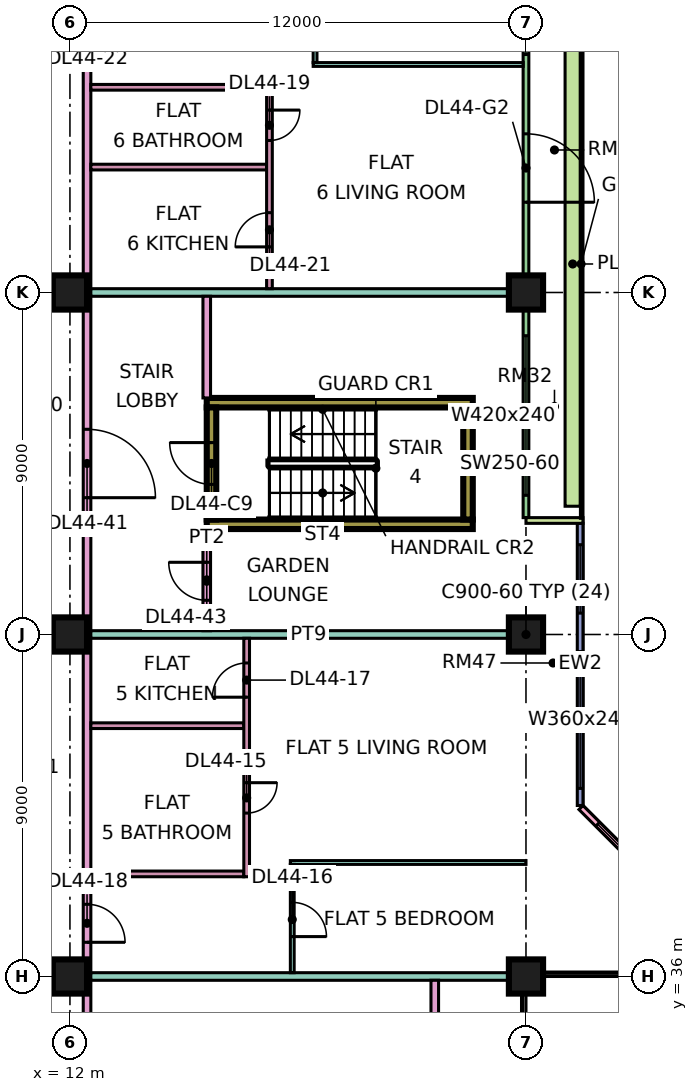
"""IFC4 building model, lengths in metres.
Left out: names, types, materials, properties, quantities, classifications, styles, units other than length and angle.
Written with IfcOpenShell. Run it as: python <this file> out.ifc"""

import sys

from ifc_helpers import new_model, si_unit, direction, frame, frame_2d, origin, origin_2d, place, context, subcontext, project, spatial, rectangle, extrude, element, fill, save


model = new_model("IFC4")
c1 = context("Model", 3, precision=1e-05, world=origin(), true_north=direction((0.0, 1.0)))
c2 = subcontext(c1, "Body", "Model", "MODEL_VIEW")
j1 = project(units=[si_unit("LENGTHUNIT", "METRE"), si_unit("PLANEANGLEUNIT", "RADIAN")], contexts=[c1])
p1 = place(None, origin())
s1 = spatial("IfcSite", under=j1, at=p1, CompositionType="ELEMENT")
p2 = place(p1, origin())
s2 = spatial("IfcBuilding", under=s1, at=p2, CompositionType="ELEMENT")
p3 = place(p2, frame((0.0, 0.0, 191.15)))
s3 = spatial("IfcBuildingStorey", under=s2, at=p3, CompositionType="ELEMENT", Elevation=191.15)
for number, where, z_axis, x_axis in (
    (1, (12.0, 36.0, 0.0), (0.0, 0.0, 1.0), (1.0, 0.0, 0.0)),
    (2, (12.0, 45.0, 0.0), (0.0, 0.0, 1.0), (1.0, 0.0, 0.0)),
    (3, (12.0, 54.0, 0.0), (0.0, 0.0, 1.0), (1.0, 0.0, 0.0)),
    (4, (24.0, 36.0, 0.0), (0.0, 0.0, 1.0), (1.0, 0.0, 0.0)),
    (5, (24.0, 45.0, 0.0), (0.0, 0.0, 1.0), (1.0, 0.0, 0.0)),
    (6, (24.0, 54.0, 0.0), (0.0, 0.0, 1.0), (1.0, 0.0, 0.0)),
):
    element("IfcColumn", number, at=place(p3, frame(where, z_axis=z_axis, x_axis=x_axis)), inside=s3, PredefinedType="COLUMN", context=c2, shape_type="SweptSolid", body=[
        extrude(rectangle(XDim=0.9, YDim=0.9, at=origin_2d()), origin(), (0.0, 0.0, 1.0), 3.75),
    ])
for number, where, z_axis, x_axis in (
    (7, (15.6, 47.9, 0.0), (0.0, 0.0, 1.0), (1.0, 0.0, 0.0)),
    (8, (15.6, 51.1, 0.0), (0.0, 0.0, 1.0), (1.0, 0.0, 0.0)),
):
    element("IfcWall", number, at=place(p3, frame(where, z_axis=z_axis, x_axis=x_axis)), inside=s3, PredefinedType="SHEAR", context=c2, shape_type="SweptSolid", body=[
        extrude(rectangle(XDim=7.0, YDim=0.25, at=frame_2d((3.5, 0.0))), origin(), (0.0, 0.0, 1.0), 3.75),
    ])
p4 = place(p3, frame((15.725, 48.025, 0.0), z_axis=(0.0, 0.0, 1.0), x_axis=(0.0, 1.0, 0.0)))
e9 = element("IfcWall", 9, at=p4, inside=s3, PredefinedType="SHEAR", context=c2, shape_type="SweptSolid", body=[
    extrude(rectangle(XDim=2.95, YDim=0.25, at=frame_2d((1.475, 0.0))), origin(), (0.0, 0.0, 1.0), 3.75),
])
p5 = place(p4, frame((0.925, 0.0, 0.0)))
e10 = element("IfcOpeningElement", 10, at=p5, cuts=e9, PredefinedType="OPENING", context=c2, shape_type="SweptSolid", body=[
    extrude(rectangle(XDim=1.1, YDim=2.2, at=frame_2d((0.55, 1.1))), frame((0.0, 0.135, 0.0), z_axis=(0.0, -1.0, 0.0), x_axis=(1.0, 0.0, 0.0)), (0.0, 0.0, 1.0), 0.27),
])
p6 = place(p3, frame((22.475, 48.025, 0.0), z_axis=(0.0, 0.0, 1.0), x_axis=(0.0, 1.0, 0.0)))
e11 = element("IfcWall", 11, at=p6, inside=s3, PredefinedType="SHEAR", context=c2, shape_type="SweptSolid", body=[
    extrude(rectangle(XDim=2.95, YDim=0.25, at=frame_2d((1.475, 0.0))), origin(), (0.0, 0.0, 1.0), 3.75),
])
p7 = place(p3, frame((28.447, 37.447, 0.0), z_axis=(0.0, 0.0, 1.0), x_axis=(-0.707106781187, 0.707106781187, 0.0)))
e12 = element("IfcWall", 12, at=p7, inside=s3, PredefinedType="SOLIDWALL", context=c2, shape_type="SweptSolid", body=[
    extrude(rectangle(XDim=4.243, YDim=0.15, at=frame_2d((2.121, 0.0))), origin(), (0.0, 0.0, 1.0), 3.35),
])
p8 = place(p7, frame((0.621, 0.0, 0.45)))
e13 = element("IfcOpeningElement", 13, at=p8, cuts=e12, PredefinedType="OPENING", context=c2, shape_type="SweptSolid", body=[
    extrude(rectangle(XDim=3.0, YDim=2.4, at=frame_2d((1.5, 1.2))), frame((0.0, 0.085, 0.0), z_axis=(0.0, -1.0, 0.0), x_axis=(1.0, 0.0, 0.0)), (0.0, 0.0, 1.0), 0.17),
])
p9 = place(p3, frame((25.425, 40.5, 0.0), z_axis=(0.0, 0.0, 1.0), x_axis=(0.0, 1.0, 0.0)))
e14 = element("IfcWall", 14, at=p9, inside=s3, PredefinedType="SOLIDWALL", context=c2, shape_type="SweptSolid", body=[
    extrude(rectangle(XDim=7.425, YDim=0.15, at=frame_2d((3.712, 0.0))), origin(), (0.0, 0.0, 1.0), 3.35),
])
p10 = place(p9, frame((0.45, 0.0, 0.45)))
e15 = element("IfcOpeningElement", 15, at=p10, cuts=e14, PredefinedType="OPENING", context=c2, shape_type="SweptSolid", body=[
    extrude(rectangle(XDim=3.6, YDim=2.4, at=frame_2d((1.8, 1.2))), frame((0.0, 0.085, 0.0), z_axis=(0.0, -1.0, 0.0), x_axis=(1.0, 0.0, 0.0)), (0.0, 0.0, 1.0), 0.17),
])
p11 = place(p9, frame((5.062, 0.0, 0.45)))
e16 = element("IfcOpeningElement", 16, at=p11, cuts=e14, PredefinedType="OPENING", context=c2, shape_type="SweptSolid", body=[
    extrude(rectangle(XDim=1.8, YDim=2.4, at=frame_2d((0.9, 1.2))), frame((0.0, 0.085, 0.0), z_axis=(0.0, -1.0, 0.0), x_axis=(1.0, 0.0, 0.0)), (0.0, 0.0, 1.0), 0.17),
])
p12 = place(p3, frame((24.0, 48.075, 0.0), z_axis=(0.0, 0.0, 1.0), x_axis=(0.0, 1.0, 0.0)))
e17 = element("IfcWall", 17, at=p12, inside=s3, PredefinedType="SOLIDWALL", context=c2, shape_type="SweptSolid", body=[
    extrude(rectangle(XDim=13.35, YDim=0.15, at=frame_2d((6.675, 0.0))), origin(), (0.0, 0.0, 1.0), 3.35),
])
p13 = place(p12, frame((0.587, 0.0, 0.45)))
e18 = element("IfcOpeningElement", 18, at=p13, cuts=e17, PredefinedType="OPENING", context=c2, shape_type="SweptSolid", body=[
    extrude(rectangle(XDim=4.2, YDim=2.4, at=frame_2d((2.1, 1.2))), frame((0.0, 0.085, 0.0), z_axis=(0.0, -1.0, 0.0), x_axis=(1.0, 0.0, 0.0)), (0.0, 0.0, 1.0), 0.17),
])
p14 = place(p12, frame((8.3, 0.0, 0.0)))
e19 = element("IfcOpeningElement", 19, at=p14, cuts=e17, PredefinedType="OPENING", context=c2, shape_type="SweptSolid", body=[
    extrude(rectangle(XDim=1.8, YDim=2.4, at=frame_2d((0.9, 1.2))), frame((0.0, 0.085, 0.0), z_axis=(0.0, -1.0, 0.0), x_axis=(1.0, 0.0, 0.0)), (0.0, 0.0, 1.0), 0.17),
])
p15 = place(p12, frame((12.188, 0.0, 0.45)))
e20 = element("IfcOpeningElement", 20, at=p15, cuts=e17, PredefinedType="OPENING", context=c2, shape_type="SweptSolid", body=[
    extrude(rectangle(XDim=0.9, YDim=2.4, at=frame_2d((0.45, 1.2))), frame((0.0, 0.085, 0.0), z_axis=(0.0, -1.0, 0.0), x_axis=(1.0, 0.0, 0.0)), (0.0, 0.0, 1.0), 0.17),
])
p16 = place(p3, frame((25.5, 48.0, 0.0), z_axis=(0.0, 0.0, 1.0), x_axis=(-1.0, 0.0, 0.0)))
e21 = element("IfcWall", 21, at=p16, inside=s3, PredefinedType="SOLIDWALL", context=c2, shape_type="SweptSolid", body=[
    extrude(rectangle(XDim=1.5, YDim=0.15, at=frame_2d((0.75, 0.0))), origin(), (0.0, 0.0, 1.0), 3.35),
])
p17 = place(p3, frame((25.229, 48.375, 0.0), z_axis=(0.0, 0.0, 1.0), x_axis=(0.0, 1.0, 0.0)))
e22 = element("IfcWall", 22, at=p17, inside=s3, PredefinedType="SOLIDWALL", context=c2, shape_type="SweptSolid", body=[
    extrude(rectangle(XDim=12.75, YDim=0.4, at=frame_2d((6.375, 0.0))), origin(), (0.0, 0.0, 1.0), 0.7),
])
p18 = place(p3, frame((12.45, 20.0, 0.0), z_axis=(0.0, 0.0, 1.0), x_axis=(0.0, 1.0, 0.0)))
e23 = element("IfcWall", 23, at=p18, inside=s3, PredefinedType="PARTITIONING", context=c2, shape_type="SweptSolid", body=[
    extrude(rectangle(XDim=43.0, YDim=0.2, at=frame_2d((21.5, 0.0))), origin(), (0.0, 0.0, 1.0), 3.35),
])
p19 = place(p18, frame((6.7, 0.0, 0.0)))
e24 = element("IfcOpeningElement", 24, at=p19, cuts=e23, PredefinedType="OPENING", context=c2, shape_type="SweptSolid", body=[
    extrude(rectangle(XDim=1.6, YDim=2.1, at=frame_2d((0.8, 1.05))), frame((0.0, 0.11, 0.0), z_axis=(0.0, -1.0, 0.0), x_axis=(1.0, 0.0, 0.0)), (0.0, 0.0, 1.0), 0.22),
])
p20 = place(p18, frame((12.95, 0.0, 0.0)))
e25 = element("IfcOpeningElement", 25, at=p20, cuts=e23, PredefinedType="OPENING", context=c2, shape_type="SweptSolid", body=[
    extrude(rectangle(XDim=1.0, YDim=2.1, at=frame_2d((0.5, 1.05))), frame((0.0, 0.11, 0.0), z_axis=(0.0, -1.0, 0.0), x_axis=(1.0, 0.0, 0.0)), (0.0, 0.0, 1.0), 0.22),
])
p21 = place(p18, frame((16.9, 0.0, 0.0)))
e26 = element("IfcOpeningElement", 26, at=p21, cuts=e23, PredefinedType="OPENING", context=c2, shape_type="SweptSolid", body=[
    extrude(rectangle(XDim=1.0, YDim=2.1, at=frame_2d((0.5, 1.05))), frame((0.0, 0.11, 0.0), z_axis=(0.0, -1.0, 0.0), x_axis=(1.0, 0.0, 0.0)), (0.0, 0.0, 1.0), 0.22),
])
p22 = place(p18, frame((40.75, 0.0, 0.0)))
e27 = element("IfcOpeningElement", 27, at=p22, cuts=e23, PredefinedType="OPENING", context=c2, shape_type="SweptSolid", body=[
    extrude(rectangle(XDim=1.0, YDim=2.1, at=frame_2d((0.5, 1.05))), frame((0.0, 0.11, 0.0), z_axis=(0.0, -1.0, 0.0), x_axis=(1.0, 0.0, 0.0)), (0.0, 0.0, 1.0), 0.22),
])
p23 = place(p18, frame((1.15, 0.0, 0.0)))
e28 = element("IfcOpeningElement", 28, at=p23, cuts=e23, PredefinedType="OPENING", context=c2, shape_type="SweptSolid", body=[
    extrude(rectangle(XDim=1.8, YDim=2.1, at=frame_2d((0.9, 1.05))), frame((0.0, 0.11, 0.0), z_axis=(0.0, -1.0, 0.0), x_axis=(1.0, 0.0, 0.0)), (0.0, 0.0, 1.0), 0.22),
])
p24 = place(p18, frame((28.6, 0.0, 0.0)))
e29 = element("IfcOpeningElement", 29, at=p24, cuts=e23, PredefinedType="OPENING", context=c2, shape_type="SweptSolid", body=[
    extrude(rectangle(XDim=1.8, YDim=2.1, at=frame_2d((0.9, 1.05))), frame((0.0, 0.11, 0.0), z_axis=(0.0, -1.0, 0.0), x_axis=(1.0, 0.0, 0.0)), (0.0, 0.0, 1.0), 0.22),
])
p25 = place(p3, frame((12.55, 36.0, 0.0), z_axis=(0.0, 0.0, 1.0), x_axis=(1.0, 0.0, 0.0)))
e30 = element("IfcWall", 30, at=p25, inside=s3, PredefinedType="PARTITIONING", context=c2, shape_type="SweptSolid", body=[
    extrude(rectangle(XDim=11.45, YDim=0.2, at=frame_2d((5.725, 0.0))), origin(), (0.0, 0.0, 1.0), 3.35),
])
for number, where, z_axis, x_axis in (
    (31, (12.55, 38.7, 0.0), (0.0, 0.0, 1.0), (1.0, 0.0, 0.0)),
    (32, (12.55, 42.6, 0.0), (0.0, 0.0, 1.0), (1.0, 0.0, 0.0)),
):
    element("IfcWall", number, at=place(p3, frame(where, z_axis=z_axis, x_axis=x_axis)), inside=s3, PredefinedType="PARTITIONING", context=c2, shape_type="SweptSolid", body=[
        extrude(rectangle(XDim=4.025, YDim=0.15, at=frame_2d((2.012, 0.0))), origin(), (0.0, 0.0, 1.0), 3.35),
    ])
p26 = place(p3, frame((12.55, 45.0, 0.0), z_axis=(0.0, 0.0, 1.0), x_axis=(1.0, 0.0, 0.0)))
e33 = element("IfcWall", 33, at=p26, inside=s3, PredefinedType="PARTITIONING", context=c2, shape_type="SweptSolid", body=[
    extrude(rectangle(XDim=11.45, YDim=0.2, at=frame_2d((5.725, 0.0))), origin(), (0.0, 0.0, 1.0), 3.35),
])
p27 = place(p3, frame((12.55, 54.0, 0.0), z_axis=(0.0, 0.0, 1.0), x_axis=(1.0, 0.0, 0.0)))
e34 = element("IfcWall", 34, at=p27, inside=s3, PredefinedType="PARTITIONING", context=c2, shape_type="SweptSolid", body=[
    extrude(rectangle(XDim=11.376, YDim=0.2, at=frame_2d((5.688, 0.0))), origin(), (0.0, 0.0, 1.0), 3.35),
])
for number, where, z_axis, x_axis in (
    (35, (12.55, 57.3, 0.0), (0.0, 0.0, 1.0), (1.0, 0.0, 0.0)),
    (36, (12.55, 59.4, 0.0), (0.0, 0.0, 1.0), (1.0, 0.0, 0.0)),
):
    element("IfcWall", number, at=place(p3, frame(where, z_axis=z_axis, x_axis=x_axis)), inside=s3, PredefinedType="PARTITIONING", context=c2, shape_type="SweptSolid", body=[
        extrude(rectangle(XDim=4.625, YDim=0.15, at=frame_2d((2.312, 0.0))), origin(), (0.0, 0.0, 1.0), 3.35),
    ])
p28 = place(p3, frame((15.6, 45.1, 0.0), z_axis=(0.0, 0.0, 1.0), x_axis=(0.0, 1.0, 0.0)))
e37 = element("IfcWall", 37, at=p28, inside=s3, PredefinedType="PARTITIONING", context=c2, shape_type="SweptSolid", body=[
    extrude(rectangle(XDim=2.675, YDim=0.2, at=frame_2d((1.337, 0.0))), origin(), (0.0, 0.0, 1.0), 3.35),
])
p29 = place(p28, frame((0.8, 0.0, 0.0)))
e38 = element("IfcOpeningElement", 38, at=p29, cuts=e37, PredefinedType="OPENING", context=c2, shape_type="SweptSolid", body=[
    extrude(rectangle(XDim=1.0, YDim=2.1, at=frame_2d((0.5, 1.05))), frame((0.0, 0.11, 0.0), z_axis=(0.0, -1.0, 0.0), x_axis=(1.0, 0.0, 0.0)), (0.0, 0.0, 1.0), 0.22),
])
p30 = place(p3, frame((15.6, 51.225, 0.0), z_axis=(0.0, 0.0, 1.0), x_axis=(0.0, 1.0, 0.0)))
e39 = element("IfcWall", 39, at=p30, inside=s3, PredefinedType="PARTITIONING", context=c2, shape_type="SweptSolid", body=[
    extrude(rectangle(XDim=2.675, YDim=0.2, at=frame_2d((1.337, 0.0))), origin(), (0.0, 0.0, 1.0), 3.35),
])
p31 = place(p3, frame((16.65, 38.625, 0.0), z_axis=(0.0, 0.0, 1.0), x_axis=(0.0, 1.0, 0.0)))
e40 = element("IfcWall", 40, at=p31, inside=s3, PredefinedType="PARTITIONING", context=c2, shape_type="SweptSolid", body=[
    extrude(rectangle(XDim=6.275, YDim=0.15, at=frame_2d((3.137, 0.0))), origin(), (0.0, 0.0, 1.0), 3.35),
])
p32 = place(p31, frame((1.675, 0.0, 0.0)))
e41 = element("IfcOpeningElement", 41, at=p32, cuts=e40, PredefinedType="OPENING", context=c2, shape_type="SweptSolid", body=[
    extrude(rectangle(XDim=0.8, YDim=2.1, at=frame_2d((0.4, 1.05))), frame((0.0, 0.085, 0.0), z_axis=(0.0, -1.0, 0.0), x_axis=(1.0, 0.0, 0.0)), (0.0, 0.0, 1.0), 0.17),
])
p33 = place(p31, frame((4.725, 0.0, 0.0)))
e42 = element("IfcOpeningElement", 42, at=p33, cuts=e40, PredefinedType="OPENING", context=c2, shape_type="SweptSolid", body=[
    extrude(rectangle(XDim=0.9, YDim=2.1, at=frame_2d((0.45, 1.05))), frame((0.0, 0.085, 0.0), z_axis=(0.0, -1.0, 0.0), x_axis=(1.0, 0.0, 0.0)), (0.0, 0.0, 1.0), 0.17),
])
p34 = place(p3, frame((17.25, 54.1, 0.0), z_axis=(0.0, 0.0, 1.0), x_axis=(0.0, 1.0, 0.0)))
e43 = element("IfcWall", 43, at=p34, inside=s3, PredefinedType="PARTITIONING", context=c2, shape_type="SweptSolid", body=[
    extrude(rectangle(XDim=5.375, YDim=0.15, at=frame_2d((2.688, 0.0))), origin(), (0.0, 0.0, 1.0), 3.35),
])
p35 = place(p34, frame((3.9, 0.0, 0.0)))
e44 = element("IfcOpeningElement", 44, at=p35, cuts=e43, PredefinedType="OPENING", context=c2, shape_type="SweptSolid", body=[
    extrude(rectangle(XDim=0.8, YDim=2.1, at=frame_2d((0.4, 1.05))), frame((0.0, 0.085, 0.0), z_axis=(0.0, -1.0, 0.0), x_axis=(1.0, 0.0, 0.0)), (0.0, 0.0, 1.0), 0.17),
])
p36 = place(p34, frame((1.1, 0.0, 0.0)))
e45 = element("IfcOpeningElement", 45, at=p36, cuts=e43, PredefinedType="OPENING", context=c2, shape_type="SweptSolid", body=[
    extrude(rectangle(XDim=0.9, YDim=2.1, at=frame_2d((0.45, 1.05))), frame((0.0, 0.085, 0.0), z_axis=(0.0, -1.0, 0.0), x_axis=(1.0, 0.0, 0.0)), (0.0, 0.0, 1.0), 0.17),
])
p37 = place(p3, frame((17.8, 39.0, 0.0), z_axis=(0.0, 0.0, 1.0), x_axis=(1.0, 0.0, 0.0)))
e46 = element("IfcWall", 46, at=p37, inside=s3, PredefinedType="PARTITIONING", context=c2, shape_type="SweptSolid", body=[
    extrude(rectangle(XDim=6.2, YDim=0.1, at=frame_2d((3.1, 0.0))), origin(), (0.0, 0.0, 1.0), 3.35),
])
p38 = place(p3, frame((17.85, 36.1, 0.0), z_axis=(0.0, 0.0, 1.0), x_axis=(0.0, 1.0, 0.0)))
e47 = element("IfcWall", 47, at=p38, inside=s3, PredefinedType="PARTITIONING", context=c2, shape_type="SweptSolid", body=[
    extrude(rectangle(XDim=2.85, YDim=0.1, at=frame_2d((1.425, 0.0))), origin(), (0.0, 0.0, 1.0), 3.35),
])
p39 = place(p38, frame((0.95, 0.0, 0.0)))
e48 = element("IfcOpeningElement", 48, at=p39, cuts=e47, PredefinedType="OPENING", context=c2, shape_type="SweptSolid", body=[
    extrude(rectangle(XDim=0.9, YDim=2.1, at=frame_2d((0.45, 1.05))), frame((0.0, 0.06, 0.0), z_axis=(0.0, -1.0, 0.0), x_axis=(1.0, 0.0, 0.0)), (0.0, 0.0, 1.0), 0.12),
])
p40 = place(p3, frame((18.4, 60.0, 0.0), z_axis=(0.0, 0.0, 1.0), x_axis=(1.0, 0.0, 0.0)))
e49 = element("IfcWall", 49, at=p40, inside=s3, PredefinedType="PARTITIONING", context=c2, shape_type="SweptSolid", body=[
    extrude(rectangle(XDim=5.526, YDim=0.1, at=frame_2d((2.763, 0.0))), origin(), (0.0, 0.0, 1.0), 3.35),
])
p41 = place(p3, frame((18.45, 60.05, 0.0), z_axis=(0.0, 0.0, 1.0), x_axis=(0.0, 1.0, 0.0)))
e50 = element("IfcWall", 50, at=p41, inside=s3, PredefinedType="PARTITIONING", context=c2, shape_type="SweptSolid", body=[
    extrude(rectangle(XDim=3.0, YDim=0.1, at=frame_2d((1.5, 0.0))), origin(), (0.0, 0.0, 1.0), 3.35),
])
p42 = place(p41, frame((1.0, 0.0, 0.0)))
e51 = element("IfcOpeningElement", 51, at=p42, cuts=e50, PredefinedType="OPENING", context=c2, shape_type="SweptSolid", body=[
    extrude(rectangle(XDim=0.9, YDim=2.1, at=frame_2d((0.45, 1.05))), frame((0.0, 0.06, 0.0), z_axis=(0.0, -1.0, 0.0), x_axis=(1.0, 0.0, 0.0)), (0.0, 0.0, 1.0), 0.12),
])
p43 = place(p3, frame((21.6, 23.9, 0.0), z_axis=(0.0, 0.0, 1.0), x_axis=(0.0, 1.0, 0.0)))
e52 = element("IfcWall", 52, at=p43, inside=s3, PredefinedType="PARTITIONING", context=c2, shape_type="SweptSolid", body=[
    extrude(rectangle(XDim=12.0, YDim=0.2, at=frame_2d((6.0, 0.0))), origin(), (0.0, 0.0, 1.0), 3.35),
])
p44 = place(p8, origin())
e53 = element("IfcWindow", 53, at=p44, inside=s3, PartitioningType="SINGLE_PANEL", PredefinedType="WINDOW", context=c2, shape_type="SweptSolid", body=[
    extrude(rectangle(XDim=3.0, YDim=2.4, at=frame_2d((1.5, 1.2))), frame((0.0, 0.03, 0.0), z_axis=(0.0, -1.0, 0.0), x_axis=(1.0, 0.0, 0.0)), (0.0, 0.0, 1.0), 0.06),
])
fill(e13, e53)
p45 = place(p10, origin())
e54 = element("IfcWindow", 54, at=p45, inside=s3, PartitioningType="SINGLE_PANEL", PredefinedType="WINDOW", context=c2, shape_type="SweptSolid", body=[
    extrude(rectangle(XDim=3.6, YDim=2.4, at=frame_2d((1.8, 1.2))), frame((0.0, 0.03, 0.0), z_axis=(0.0, -1.0, 0.0), x_axis=(1.0, 0.0, 0.0)), (0.0, 0.0, 1.0), 0.06),
])
fill(e15, e54)
p46 = place(p11, origin())
e55 = element("IfcWindow", 55, at=p46, inside=s3, PartitioningType="SINGLE_PANEL", PredefinedType="WINDOW", context=c2, shape_type="SweptSolid", body=[
    extrude(rectangle(XDim=1.8, YDim=2.4, at=frame_2d((0.9, 1.2))), frame((0.0, 0.03, 0.0), z_axis=(0.0, -1.0, 0.0), x_axis=(1.0, 0.0, 0.0)), (0.0, 0.0, 1.0), 0.06),
])
fill(e16, e55)
p47 = place(p13, origin())
e56 = element("IfcWindow", 56, at=p47, inside=s3, PartitioningType="SINGLE_PANEL", PredefinedType="WINDOW", context=c2, shape_type="SweptSolid", body=[
    extrude(rectangle(XDim=4.2, YDim=2.4, at=frame_2d((2.1, 1.2))), frame((0.0, 0.03, 0.0), z_axis=(0.0, -1.0, 0.0), x_axis=(1.0, 0.0, 0.0)), (0.0, 0.0, 1.0), 0.06),
])
fill(e18, e56)
p48 = place(p14, frame((1.8, 0.0, 0.0), z_axis=(0.0, 0.0, 1.0), x_axis=(-1.0, 0.0, 0.0)))
e57 = element("IfcDoor", 57, at=p48, inside=s3, OperationType="DOUBLE_DOOR_SINGLE_SWING", PredefinedType="DOOR", context=c2, shape_type="SweptSolid", body=[
    extrude(rectangle(XDim=1.8, YDim=2.4, at=frame_2d((0.9, 1.2))), frame((0.0, 0.025, 0.0), z_axis=(0.0, -1.0, 0.0), x_axis=(1.0, 0.0, 0.0)), (0.0, 0.0, 1.0), 0.05),
])
fill(e19, e57)
p49 = place(p15, origin())
e58 = element("IfcWindow", 58, at=p49, inside=s3, PartitioningType="SINGLE_PANEL", PredefinedType="WINDOW", context=c2, shape_type="SweptSolid", body=[
    extrude(rectangle(XDim=0.9, YDim=2.4, at=frame_2d((0.45, 1.2))), frame((0.0, 0.03, 0.0), z_axis=(0.0, -1.0, 0.0), x_axis=(1.0, 0.0, 0.0)), (0.0, 0.0, 1.0), 0.06),
])
fill(e20, e58)
p50 = place(p5, frame((1.1, 0.0, 0.0), z_axis=(0.0, 0.0, 1.0), x_axis=(-1.0, 0.0, 0.0)))
e59 = element("IfcDoor", 59, at=p50, inside=s3, OperationType="SINGLE_SWING_RIGHT", PredefinedType="DOOR", context=c2, shape_type="SweptSolid", body=[
    extrude(rectangle(XDim=1.1, YDim=2.2, at=frame_2d((0.55, 1.1))), frame((0.0, 0.025, 0.0), z_axis=(0.0, -1.0, 0.0), x_axis=(1.0, 0.0, 0.0)), (0.0, 0.0, 1.0), 0.05),
])
fill(e10, e59)
p51 = place(p32, origin())
e60 = element("IfcDoor", 60, at=p51, inside=s3, OperationType="SINGLE_SWING_RIGHT", PredefinedType="DOOR", context=c2, shape_type="SweptSolid", body=[
    extrude(rectangle(XDim=0.8, YDim=2.1, at=frame_2d((0.4, 1.05))), frame((0.0, 0.025, 0.0), z_axis=(0.0, -1.0, 0.0), x_axis=(1.0, 0.0, 0.0)), (0.0, 0.0, 1.0), 0.05),
])
fill(e41, e60)
p52 = place(p39, frame((0.9, 0.0, 0.0), z_axis=(0.0, 0.0, 1.0), x_axis=(-1.0, 0.0, 0.0)))
e61 = element("IfcDoor", 61, at=p52, inside=s3, OperationType="SINGLE_SWING_LEFT", PredefinedType="DOOR", context=c2, shape_type="SweptSolid", body=[
    extrude(rectangle(XDim=0.9, YDim=2.1, at=frame_2d((0.45, 1.05))), frame((0.0, 0.025, 0.0), z_axis=(0.0, -1.0, 0.0), x_axis=(1.0, 0.0, 0.0)), (0.0, 0.0, 1.0), 0.05),
])
fill(e48, e61)
p53 = place(p33, origin())
e62 = element("IfcDoor", 62, at=p53, inside=s3, OperationType="SINGLE_SWING_LEFT", PredefinedType="DOOR", context=c2, shape_type="SweptSolid", body=[
    extrude(rectangle(XDim=0.9, YDim=2.1, at=frame_2d((0.45, 1.05))), frame((0.0, 0.025, 0.0), z_axis=(0.0, -1.0, 0.0), x_axis=(1.0, 0.0, 0.0)), (0.0, 0.0, 1.0), 0.05),
])
fill(e42, e62)
p54 = place(p21, frame((1.0, 0.0, 0.0), z_axis=(0.0, 0.0, 1.0), x_axis=(-1.0, 0.0, 0.0)))
e63 = element("IfcDoor", 63, at=p54, inside=s3, OperationType="SINGLE_SWING_LEFT", PredefinedType="DOOR", context=c2, shape_type="SweptSolid", body=[
    extrude(rectangle(XDim=1.0, YDim=2.1, at=frame_2d((0.5, 1.05))), frame((0.0, 0.025, 0.0), z_axis=(0.0, -1.0, 0.0), x_axis=(1.0, 0.0, 0.0)), (0.0, 0.0, 1.0), 0.05),
])
fill(e26, e63)
p55 = place(p35, origin())
e64 = element("IfcDoor", 64, at=p55, inside=s3, OperationType="SINGLE_SWING_RIGHT", PredefinedType="DOOR", context=c2, shape_type="SweptSolid", body=[
    extrude(rectangle(XDim=0.8, YDim=2.1, at=frame_2d((0.4, 1.05))), frame((0.0, 0.025, 0.0), z_axis=(0.0, -1.0, 0.0), x_axis=(1.0, 0.0, 0.0)), (0.0, 0.0, 1.0), 0.05),
])
fill(e44, e64)
p56 = place(p36, origin())
e65 = element("IfcDoor", 65, at=p56, inside=s3, OperationType="SINGLE_SWING_LEFT", PredefinedType="DOOR", context=c2, shape_type="SweptSolid", body=[
    extrude(rectangle(XDim=0.9, YDim=2.1, at=frame_2d((0.45, 1.05))), frame((0.0, 0.025, 0.0), z_axis=(0.0, -1.0, 0.0), x_axis=(1.0, 0.0, 0.0)), (0.0, 0.0, 1.0), 0.05),
])
fill(e45, e65)
p57 = place(p24, frame((1.8, 0.0, 0.0), z_axis=(0.0, 0.0, 1.0), x_axis=(-1.0, 0.0, 0.0)))
e66 = element("IfcDoor", 66, at=p57, inside=s3, OperationType="DOUBLE_DOOR_SINGLE_SWING", PredefinedType="DOOR", context=c2, shape_type="SweptSolid", body=[
    extrude(rectangle(XDim=1.8, YDim=2.1, at=frame_2d((0.9, 1.05))), frame((0.0, 0.025, 0.0), z_axis=(0.0, -1.0, 0.0), x_axis=(1.0, 0.0, 0.0)), (0.0, 0.0, 1.0), 0.05),
])
fill(e29, e66)
p58 = place(p29, frame((1.0, 0.0, 0.0), z_axis=(0.0, 0.0, 1.0), x_axis=(-1.0, 0.0, 0.0)))
e67 = element("IfcDoor", 67, at=p58, inside=s3, OperationType="SINGLE_SWING_RIGHT", PredefinedType="DOOR", context=c2, shape_type="SweptSolid", body=[
    extrude(rectangle(XDim=1.0, YDim=2.1, at=frame_2d((0.5, 1.05))), frame((0.0, 0.025, 0.0), z_axis=(0.0, -1.0, 0.0), x_axis=(1.0, 0.0, 0.0)), (0.0, 0.0, 1.0), 0.05),
])
fill(e38, e67)
save(model, sys.argv[1])
